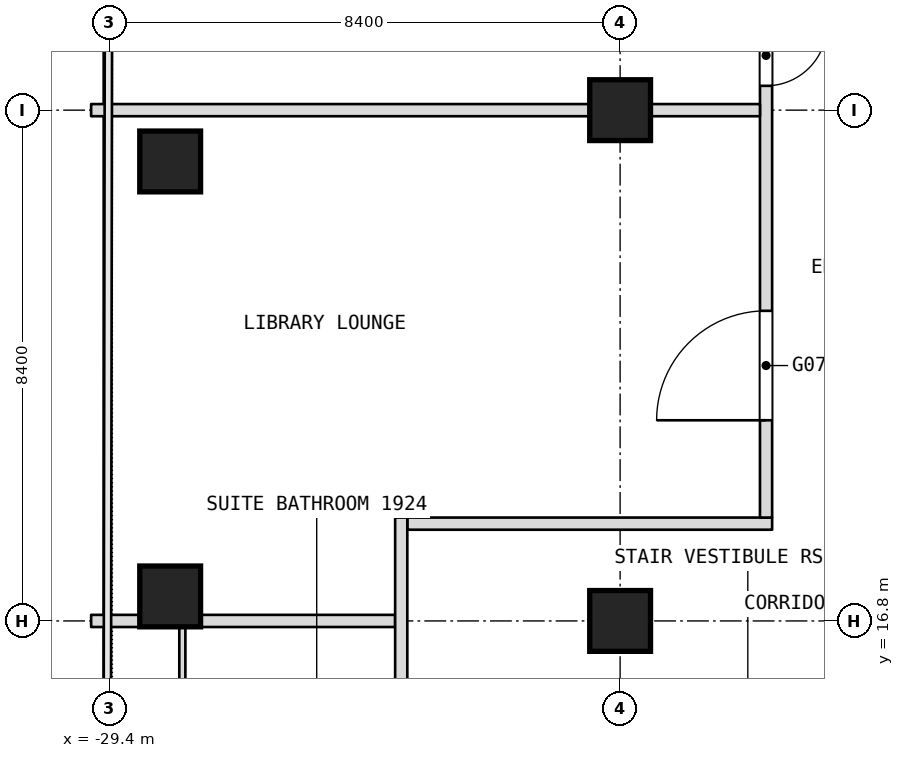
"""IFC4 building model, lengths in metres.
Left out: names, types, materials, properties, quantities, classifications, styles, units other than length and angle.
Written with IfcOpenShell. Run it as: python <this file> out.ifc"""

import sys

from ifc_helpers import new_model, si_unit, direction, frame, frame_2d, origin, origin_2d, place, context, subcontext, project, spatial, rectangle, extrude, element, fill, save


model = new_model("IFC4")
c1 = context("Model", 3, precision=1e-05, world=origin(), true_north=direction((0.0, 1.0)))
c2 = subcontext(c1, "Body", "Model", "MODEL_VIEW")
j1 = project(units=[si_unit("LENGTHUNIT", "METRE"), si_unit("PLANEANGLEUNIT", "RADIAN")], contexts=[c1])
p1 = place(None, origin())
s1 = spatial("IfcSite", under=j1, at=p1, CompositionType="ELEMENT")
p2 = place(p1, origin())
s2 = spatial("IfcBuilding", under=s1, at=p2, CompositionType="ELEMENT")
p3 = place(p2, frame((0.0, 0.0, 83.3)))
s3 = spatial("IfcBuildingStorey", under=s2, at=p3, CompositionType="ELEMENT", Elevation=83.3)
for number, where, z_axis, x_axis in (
    (1, (-21.0, 16.8, 0.0), (0.0, 0.0, 1.0), (1.0, 0.0, 0.0)),
    (2, (-21.0, 25.2, 0.0), (0.0, 0.0, 1.0), (1.0, 0.0, 0.0)),
    (3, (-28.4, 17.203, 0.0), (0.0, 0.0, 1.0), (1.0, 0.0, 0.0)),
    (4, (-28.4, 24.356, 0.0), (0.0, 0.0, 1.0), (1.0, 0.0, 0.0)),
):
    element("IfcColumn", number, at=place(p3, frame(where, z_axis=z_axis, x_axis=x_axis)), inside=s3, PredefinedType="COLUMN", context=c2, shape_type="SweptSolid", body=[
        extrude(rectangle(XDim=1.0, YDim=1.0, at=origin_2d()), origin(), (0.0, 0.0, 1.0), 3.6),
    ])
p4 = place(p3, frame((-29.7, 16.8, 0.0), z_axis=(0.0, 0.0, 1.0), x_axis=(1.0, 0.0, 0.0)))
e5 = element("IfcWall", 5, at=p4, inside=s3, PredefinedType="PARTITIONING", context=c2, shape_type="SweptSolid", body=[
    extrude(rectangle(XDim=5.0, YDim=0.2, at=frame_2d((2.5, 0.0))), origin(), (0.0, 0.0, 1.0), 2.8),
])
p5 = place(p3, frame((-24.5, 18.4, 0.0), z_axis=(0.0, 0.0, 1.0), x_axis=(1.0, 0.0, 0.0)))
e6 = element("IfcWall", 6, at=p5, inside=s3, PredefinedType="PARTITIONING", context=c2, shape_type="SweptSolid", body=[
    extrude(rectangle(XDim=6.0, YDim=0.2, at=frame_2d((3.0, 0.0))), origin(), (0.0, 0.0, 1.0), 3.3),
])
p6 = place(p3, frame((-18.6, 18.5, 0.0), z_axis=(0.0, 0.0, 1.0), x_axis=(0.0, 1.0, 0.0)))
e7 = element("IfcWall", 7, at=p6, inside=s3, PredefinedType="PARTITIONING", context=c2, shape_type="SweptSolid", body=[
    extrude(rectangle(XDim=15.04, YDim=0.2, at=frame_2d((7.52, 0.0))), origin(), (0.0, 0.0, 1.0), 3.3),
])
p7 = place(p6, frame((1.6, 0.0, 0.0)))
e8 = element("IfcOpeningElement", 8, at=p7, cuts=e7, PredefinedType="OPENING", context=c2, shape_type="SweptSolid", body=[
    extrude(rectangle(XDim=1.8, YDim=2.1, at=frame_2d((0.9, 1.05))), frame((0.0, 0.1, 0.0), z_axis=(0.0, -1.0, 0.0), x_axis=(1.0, 0.0, 0.0)), (0.0, 0.0, 1.0), 0.2),
])
p8 = place(p6, frame((7.1, 0.0, 0.0)))
e9 = element("IfcOpeningElement", 9, at=p8, cuts=e7, PredefinedType="OPENING", context=c2, shape_type="SweptSolid", body=[
    extrude(rectangle(XDim=1.0, YDim=2.1, at=frame_2d((0.5, 1.05))), frame((0.0, 0.1, 0.0), z_axis=(0.0, -1.0, 0.0), x_axis=(1.0, 0.0, 0.0)), (0.0, 0.0, 1.0), 0.2),
])
p9 = place(p6, frame((11.2, 0.0, 0.0)))
e10 = element("IfcOpeningElement", 10, at=p9, cuts=e7, PredefinedType="OPENING", context=c2, shape_type="SweptSolid", body=[
    extrude(rectangle(XDim=1.0, YDim=2.1, at=frame_2d((0.5, 1.05))), frame((0.0, 0.1, 0.0), z_axis=(0.0, -1.0, 0.0), x_axis=(1.0, 0.0, 0.0)), (0.0, 0.0, 1.0), 0.2),
])
p10 = place(p3, frame((-24.6, 6.9, 0.0), z_axis=(0.0, 0.0, 1.0), x_axis=(0.0, 1.0, 0.0)))
e11 = element("IfcWall", 11, at=p10, inside=s3, PredefinedType="PARTITIONING", context=c2, shape_type="SweptSolid", body=[
    extrude(rectangle(XDim=11.6, YDim=0.2, at=frame_2d((5.8, 0.0))), origin(), (0.0, 0.0, 1.0), 3.3),
])
p11 = place(p10, frame((5.1, 0.0, 0.0)))
e12 = element("IfcOpeningElement", 12, at=p11, cuts=e11, PredefinedType="OPENING", context=c2, shape_type="SweptSolid", body=[
    extrude(rectangle(XDim=1.1, YDim=2.1, at=frame_2d((0.55, 1.05))), frame((0.0, 0.1, 0.0), z_axis=(0.0, -1.0, 0.0), x_axis=(1.0, 0.0, 0.0)), (0.0, 0.0, 1.0), 0.2),
])
p12 = place(p3, frame((-29.7, 25.2, 0.0), z_axis=(0.0, 0.0, 1.0), x_axis=(1.0, 0.0, 0.0)))
e13 = element("IfcWall", 13, at=p12, inside=s3, PredefinedType="PARTITIONING", context=c2, shape_type="SweptSolid", body=[
    extrude(rectangle(XDim=11.0, YDim=0.2, at=frame_2d((5.5, 0.0))), origin(), (0.0, 0.0, 1.0), 2.8),
])
p13 = place(p3, frame((-28.2, 13.15, 0.0), z_axis=(0.0, 0.0, 1.0), x_axis=(0.0, 1.0, 0.0)))
e14 = element("IfcWall", 14, at=p13, inside=s3, PredefinedType="PARTITIONING", context=c2, shape_type="SweptSolid", body=[
    extrude(rectangle(XDim=3.75, YDim=0.1, at=frame_2d((1.875, 0.0))), origin(), (0.0, 0.0, 1.0), 2.486),
])
p14 = place(p7, origin())
e15 = element("IfcDoor", 15, at=p14, inside=s3, OperationType="DOUBLE_DOOR_SINGLE_SWING", PredefinedType="DOOR", context=c2, shape_type="SweptSolid", body=[
    extrude(rectangle(XDim=1.8, YDim=2.1, at=frame_2d((0.9, 1.05))), frame((0.0, 0.025, 0.0), z_axis=(0.0, -1.0, 0.0), x_axis=(1.0, 0.0, 0.0)), (0.0, 0.0, 1.0), 0.05),
])
fill(e8, e15)
p15 = place(p8, origin())
e16 = element("IfcDoor", 16, at=p15, inside=s3, OperationType="SINGLE_SWING_LEFT", PredefinedType="DOOR", context=c2, shape_type="SweptSolid", body=[
    extrude(rectangle(XDim=1.0, YDim=2.1, at=frame_2d((0.5, 1.05))), frame((0.0, 0.025, 0.0), z_axis=(0.0, -1.0, 0.0), x_axis=(1.0, 0.0, 0.0)), (0.0, 0.0, 1.0), 0.05),
])
fill(e9, e16)
save(model, sys.argv[1])
